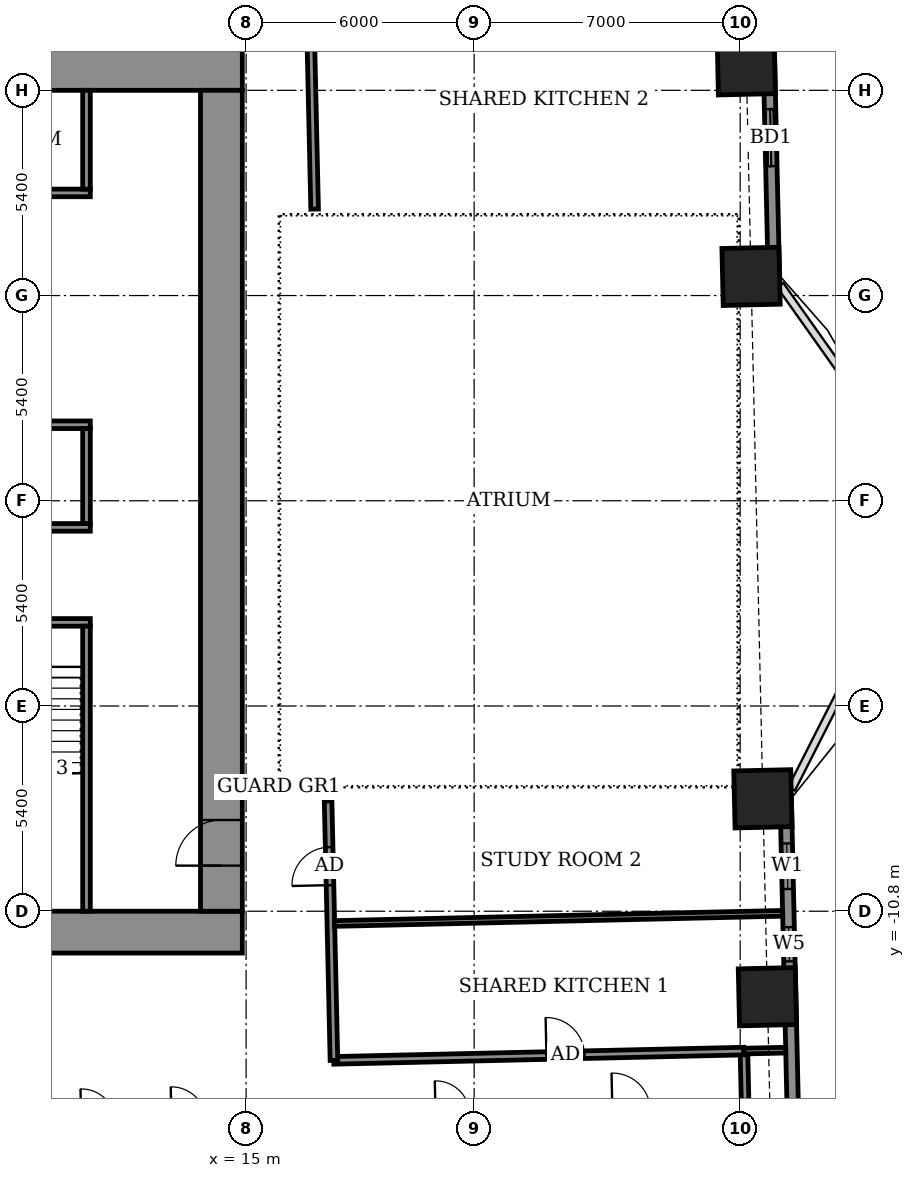
"""IFC4 building model, lengths in metres.
Left out: names, types, materials, properties, quantities, classifications, styles, units other than length and angle.
Written with IfcOpenShell. Run it as: python <this file> out.ifc"""

import sys

from ifc_helpers import new_model, si_unit, direction, frame, frame_2d, origin, origin_2d, place, context, subcontext, project, spatial, rectangle, extrude, element, fill, save


model = new_model("IFC4")
c1 = context("Model", 3, precision=1e-05, world=origin(), true_north=direction((0.0, 1.0)))
c2 = subcontext(c1, "Body", "Model", "MODEL_VIEW")
j1 = project(units=[si_unit("LENGTHUNIT", "METRE"), si_unit("PLANEANGLEUNIT", "RADIAN")], contexts=[c1])
p1 = place(None, origin())
s1 = spatial("IfcSite", under=j1, at=p1, CompositionType="ELEMENT")
p2 = place(p1, origin())
s2 = spatial("IfcBuilding", under=s1, at=p2, CompositionType="ELEMENT")
p3 = place(p2, frame((0.0, 0.0, 44.9)))
s3 = spatial("IfcBuildingStorey", under=s2, at=p3, CompositionType="ELEMENT", Elevation=44.9)
for number, where, z_axis, x_axis in (
    (1, (28.716, -13.049, -0.55), (0.0, 0.0, 1.0), (-0.023, 1.0, 0.0)),
    (2, (28.598, -7.842, -0.55), (0.0, 0.0, 1.0), (-0.023, 1.0, 0.0)),
    (3, (28.286, 5.905, -0.55), (0.0, 0.0, 1.0), (-0.023, 1.0, 0.0)),
    (4, (28.16, 11.445, -0.55), (0.0, 0.0, 1.0), (-0.023, 1.0, 0.0)),
):
    element("IfcColumn", number, at=place(p3, frame(where, z_axis=z_axis, x_axis=x_axis)), inside=s3, PredefinedType="COLUMN", context=c2, shape_type="SweptSolid", body=[
        extrude(rectangle(XDim=1.5, YDim=1.5, at=origin_2d()), origin(), (0.0, 0.0, 1.0), 3.6),
    ])
p4 = place(p3, frame((29.549, -23.299, 0.0), z_axis=(0.0, 0.0, 1.0), x_axis=(-0.022670336976, 0.999742994885, 0.0)))
e5 = element("IfcWall", 5, at=p4, inside=s3, PredefinedType="SOLIDWALL", context=c2, shape_type="SweptSolid", body=[
    extrude(rectangle(XDim=15.529, YDim=0.3, at=frame_2d((7.765, 0.0))), origin(), (0.0, 0.0, 1.0), 3.05),
])
p5 = place(p4, frame((2.119, 0.0, 0.0)))
e6 = element("IfcOpeningElement", 6, at=p5, cuts=e5, PredefinedType="OPENING", context=c2, shape_type="SweptSolid", body=[
    extrude(rectangle(XDim=1.5, YDim=2.4, at=frame_2d((0.75, 1.2))), frame((0.0, 0.16, 0.0), z_axis=(0.0, -1.0, 0.0), x_axis=(1.0, 0.0, 0.0)), (0.0, 0.0, 1.0), 0.32),
])
p6 = place(p4, frame((11.183, 0.0, 0.9)))
e7 = element("IfcOpeningElement", 7, at=p6, cuts=e5, PredefinedType="OPENING", context=c2, shape_type="SweptSolid", body=[
    extrude(rectangle(XDim=0.9, YDim=1.5, at=frame_2d((0.45, 0.75))), frame((0.0, 0.16, 0.0), z_axis=(0.0, -1.0, 0.0), x_axis=(1.0, 0.0, 0.0)), (0.0, 0.0, 1.0), 0.32),
])
p7 = place(p4, frame((13.087, 0.0, 0.9)))
e8 = element("IfcOpeningElement", 8, at=p7, cuts=e5, PredefinedType="OPENING", context=c2, shape_type="SweptSolid", body=[
    extrude(rectangle(XDim=1.2, YDim=1.5, at=frame_2d((0.6, 0.75))), frame((0.0, 0.16, 0.0), z_axis=(0.0, -1.0, 0.0), x_axis=(1.0, 0.0, 0.0)), (0.0, 0.0, 1.0), 0.32),
])
p8 = place(p3, frame((28.887, 5.864, 0.0), z_axis=(0.0, 0.0, 1.0), x_axis=(-0.022687182773, 0.999742612745, 0.0)))
e9 = element("IfcWall", 9, at=p8, inside=s3, PredefinedType="SOLIDWALL", context=c2, shape_type="SweptSolid", body=[
    extrude(rectangle(XDim=16.529, YDim=0.3, at=frame_2d((8.265, 0.0))), origin(), (0.0, 0.0, 1.0), 3.05),
])
p9 = place(p8, frame((2.942, 0.0, 0.0)))
e10 = element("IfcOpeningElement", 10, at=p9, cuts=e9, PredefinedType="OPENING", context=c2, shape_type="SweptSolid", body=[
    extrude(rectangle(XDim=1.5, YDim=2.4, at=frame_2d((0.75, 1.2))), frame((0.0, 0.16, 0.0), z_axis=(0.0, -1.0, 0.0), x_axis=(1.0, 0.0, 0.0)), (0.0, 0.0, 1.0), 0.32),
])
p10 = place(p8, frame((7.629, 0.0, 0.9)))
e11 = element("IfcOpeningElement", 11, at=p10, cuts=e9, PredefinedType="OPENING", context=c2, shape_type="SweptSolid", body=[
    extrude(rectangle(XDim=0.9, YDim=1.5, at=frame_2d((0.45, 0.75))), frame((0.0, 0.16, 0.0), z_axis=(0.0, -1.0, 0.0), x_axis=(1.0, 0.0, 0.0)), (0.0, 0.0, 1.0), 0.32),
])
p11 = place(p8, frame((12.341, 0.0, 0.9)))
e12 = element("IfcOpeningElement", 12, at=p11, cuts=e9, PredefinedType="OPENING", context=c2, shape_type="SweptSolid", body=[
    extrude(rectangle(XDim=2.4, YDim=1.5, at=frame_2d((1.2, 0.75))), frame((0.0, 0.16, 0.0), z_axis=(0.0, -1.0, 0.0), x_axis=(1.0, 0.0, 0.0)), (0.0, 0.0, 1.0), 0.32),
])
p12 = place(p3, frame((28.133, -15.979, 0.0), z_axis=(0.0, 0.0, 1.0), x_axis=(-0.022632637625, 0.99974384905, 0.0)))
e13 = element("IfcWall", 13, at=p12, inside=s3, PredefinedType="PARTITIONING", context=c2, shape_type="SweptSolid", body=[
    extrude(rectangle(XDim=1.5, YDim=0.2, at=frame_2d((0.75, 0.0))), origin(), (0.0, 0.0, 1.0), 3.05),
])
p13 = place(p3, frame((17.306, -14.724, 0.0), z_axis=(0.0, 0.0, 1.0), x_axis=(0.999744269809, 0.022614043969, 0.0)))
e14 = element("IfcWall", 14, at=p13, inside=s3, PredefinedType="PARTITIONING", context=c2, shape_type="SweptSolid", body=[
    extrude(rectangle(XDim=10.796, YDim=0.2, at=frame_2d((5.398, 0.0))), origin(), (0.0, 0.0, 1.0), 3.05),
])
p14 = place(p13, frame((5.598, 0.0, 0.0)))
e15 = element("IfcOpeningElement", 15, at=p14, cuts=e14, PredefinedType="OPENING", context=c2, shape_type="SweptSolid", body=[
    extrude(rectangle(XDim=1.0, YDim=2.1, at=frame_2d((0.5, 1.05))), frame((0.0, 0.11, 0.0), z_axis=(0.0, -1.0, 0.0), x_axis=(1.0, 0.0, 0.0)), (0.0, 0.0, 1.0), 0.22),
])
p15 = place(p3, frame((17.311, -14.724, 0.0), z_axis=(0.0, 0.0, 1.0), x_axis=(-0.022562209343, 0.999745440955, 0.0)))
e16 = element("IfcWall", 16, at=p15, inside=s3, PredefinedType="PARTITIONING", context=c2, shape_type="SweptSolid", body=[
    extrude(rectangle(XDim=6.828, YDim=0.2, at=frame_2d((3.414, 0.0))), origin(), (0.0, 0.0, 1.0), 3.05),
])
p16 = place(p15, frame((4.612, 0.0, 0.0)))
e17 = element("IfcOpeningElement", 17, at=p16, cuts=e16, PredefinedType="OPENING", context=c2, shape_type="SweptSolid", body=[
    extrude(rectangle(XDim=1.0, YDim=2.1, at=frame_2d((0.5, 1.05))), frame((0.0, 0.11, 0.0), z_axis=(0.0, -1.0, 0.0), x_axis=(1.0, 0.0, 0.0)), (0.0, 0.0, 1.0), 0.22),
])
p17 = place(p3, frame((28.095, -14.48, 0.0), z_axis=(0.0, 0.0, 1.0), x_axis=(0.999745251335, 0.022570609924, 0.0)))
e18 = element("IfcWall", 18, at=p17, inside=s3, PredefinedType="PARTITIONING", context=c2, shape_type="SweptSolid", body=[
    extrude(rectangle(XDim=1.103, YDim=0.15, at=frame_2d((0.552, 0.0))), origin(), (0.0, 0.0, 1.0), 2.55),
])
p18 = place(p3, frame((17.325, -11.123, 0.0), z_axis=(0.0, 0.0, 1.0), x_axis=(0.999741707298, 0.022727047508, 0.0)))
e19 = element("IfcWall", 19, at=p18, inside=s3, PredefinedType="PARTITIONING", context=c2, shape_type="SweptSolid", body=[
    extrude(rectangle(XDim=11.795, YDim=0.15, at=frame_2d((5.897, 0.0))), origin(), (0.0, 0.0, 1.0), 2.55),
])
p19 = place(p3, frame((16.803, 7.675, 0.0), z_axis=(0.0, 0.0, 1.0), x_axis=(-0.022667483124, 0.999743059595, 0.0)))
e20 = element("IfcWall", 20, at=p19, inside=s3, PredefinedType="PARTITIONING", context=c2, shape_type="SweptSolid", body=[
    extrude(rectangle(XDim=5.245, YDim=0.2, at=frame_2d((2.623, 0.0))), origin(), (0.0, 0.0, 1.0), 3.05),
])
for number, where, z_axis, x_axis in (
    (21, (-14.9, -11.35, 0.0), (0.0, 0.0, 1.0), (1.0, 0.0, 0.0)),
    (22, (-14.9, 11.35, 0.0), (0.0, 0.0, 1.0), (1.0, 0.0, 0.0)),
):
    element("IfcWall", number, at=place(p3, frame(where, z_axis=z_axis, x_axis=x_axis)), inside=s3, PredefinedType="SHEAR", context=c2, shape_type="SweptSolid", body=[
        extrude(rectangle(XDim=29.8, YDim=1.1, at=frame_2d((14.9, 0.0))), origin(), (0.0, 0.0, 1.0), 3.6),
    ])
p20 = place(p3, frame((14.35, -10.8, 0.0), z_axis=(0.0, 0.0, 1.0), x_axis=(0.0, 1.0, 0.0)))
e23 = element("IfcWall", 23, at=p20, inside=s3, PredefinedType="SHEAR", context=c2, shape_type="SweptSolid", body=[
    extrude(rectangle(XDim=21.6, YDim=1.1, at=frame_2d((10.8, 0.0))), origin(), (0.0, 0.0, 1.0), 3.6),
])
p21 = place(p20, frame((1.2, 0.0, 0.0)))
e24 = element("IfcOpeningElement", 24, at=p21, cuts=e23, PredefinedType="OPENING", context=c2, shape_type="SweptSolid", body=[
    extrude(rectangle(XDim=1.2, YDim=2.1, at=frame_2d((0.6, 1.05))), frame((0.0, 0.56, 0.0), z_axis=(0.0, -1.0, 0.0), x_axis=(1.0, 0.0, 0.0)), (0.0, 0.0, 1.0), 1.12),
])
p22 = place(p3, frame((-10.9, -3.2, 0.0), z_axis=(0.0, 0.0, 1.0), x_axis=(1.0, 0.0, 0.0)))
e25 = element("IfcWall", 25, at=p22, inside=s3, PredefinedType="SHEAR", context=c2, shape_type="SweptSolid", body=[
    extrude(rectangle(XDim=21.8, YDim=0.2, at=frame_2d((10.9, 0.0))), origin(), (0.0, 0.0, 1.0), 3.05),
])
p23 = place(p22, frame((1.075, 0.0, 0.0)))
e26 = element("IfcOpeningElement", 26, at=p23, cuts=e25, PredefinedType="OPENING", context=c2, shape_type="SweptSolid", body=[
    extrude(rectangle(XDim=1.1, YDim=2.1, at=frame_2d((0.55, 1.05))), frame((0.0, 0.11, 0.0), z_axis=(0.0, -1.0, 0.0), x_axis=(1.0, 0.0, 0.0)), (0.0, 0.0, 1.0), 0.22),
])
p24 = place(p22, frame((10.325, 0.0, 0.0)))
e27 = element("IfcOpeningElement", 27, at=p24, cuts=e25, PredefinedType="OPENING", context=c2, shape_type="SweptSolid", body=[
    extrude(rectangle(XDim=1.1, YDim=2.1, at=frame_2d((0.55, 1.05))), frame((0.0, 0.11, 0.0), z_axis=(0.0, -1.0, 0.0), x_axis=(1.0, 0.0, 0.0)), (0.0, 0.0, 1.0), 0.22),
])
p25 = place(p22, frame((19.625, 0.0, 0.0)))
e28 = element("IfcOpeningElement", 28, at=p25, cuts=e25, PredefinedType="OPENING", context=c2, shape_type="SweptSolid", body=[
    extrude(rectangle(XDim=1.1, YDim=2.1, at=frame_2d((0.55, 1.05))), frame((0.0, 0.11, 0.0), z_axis=(0.0, -1.0, 0.0), x_axis=(1.0, 0.0, 0.0)), (0.0, 0.0, 1.0), 0.22),
])
p26 = place(p22, frame((5.7, 0.0, 0.0)))
e29 = element("IfcOpeningElement", 29, at=p26, cuts=e25, PredefinedType="OPENING", context=c2, shape_type="SweptSolid", body=[
    extrude(rectangle(XDim=1.1, YDim=2.1, at=frame_2d((0.55, 1.05))), frame((0.0, 0.11, 0.0), z_axis=(0.0, -1.0, 0.0), x_axis=(1.0, 0.0, 0.0)), (0.0, 0.0, 1.0), 0.22),
])
p27 = place(p22, frame((14.975, 0.0, 0.0)))
e30 = element("IfcOpeningElement", 30, at=p27, cuts=e25, PredefinedType="OPENING", context=c2, shape_type="SweptSolid", body=[
    extrude(rectangle(XDim=1.1, YDim=2.1, at=frame_2d((0.55, 1.05))), frame((0.0, 0.11, 0.0), z_axis=(0.0, -1.0, 0.0), x_axis=(1.0, 0.0, 0.0)), (0.0, 0.0, 1.0), 0.22),
])
p28 = place(p3, frame((-10.9, -0.7, 0.0), z_axis=(0.0, 0.0, 1.0), x_axis=(1.0, 0.0, 0.0)))
e31 = element("IfcWall", 31, at=p28, inside=s3, PredefinedType="SHEAR", context=c2, shape_type="SweptSolid", body=[
    extrude(rectangle(XDim=21.8, YDim=0.2, at=frame_2d((10.9, 0.0))), origin(), (0.0, 0.0, 1.0), 3.05),
])
p29 = place(p3, frame((-10.9, 2.0, 0.0), z_axis=(0.0, 0.0, 1.0), x_axis=(1.0, 0.0, 0.0)))
e32 = element("IfcWall", 32, at=p29, inside=s3, PredefinedType="SHEAR", context=c2, shape_type="SweptSolid", body=[
    extrude(rectangle(XDim=21.8, YDim=0.2, at=frame_2d((10.9, 0.0))), origin(), (0.0, 0.0, 1.0), 3.05),
])
p30 = place(p29, frame((0.9, 0.0, 0.0)))
e33 = element("IfcOpeningElement", 33, at=p30, cuts=e32, PredefinedType="OPENING", context=c2, shape_type="SweptSolid", body=[
    extrude(rectangle(XDim=1.1, YDim=2.1, at=frame_2d((0.55, 1.05))), frame((0.0, 0.11, 0.0), z_axis=(0.0, -1.0, 0.0), x_axis=(1.0, 0.0, 0.0)), (0.0, 0.0, 1.0), 0.22),
])
p31 = place(p29, frame((3.6, 0.0, 0.0)))
e34 = element("IfcOpeningElement", 34, at=p31, cuts=e32, PredefinedType="OPENING", context=c2, shape_type="SweptSolid", body=[
    extrude(rectangle(XDim=1.1, YDim=2.1, at=frame_2d((0.55, 1.05))), frame((0.0, 0.11, 0.0), z_axis=(0.0, -1.0, 0.0), x_axis=(1.0, 0.0, 0.0)), (0.0, 0.0, 1.0), 0.22),
])
p32 = place(p29, frame((6.3, 0.0, 0.0)))
e35 = element("IfcOpeningElement", 35, at=p32, cuts=e32, PredefinedType="OPENING", context=c2, shape_type="SweptSolid", body=[
    extrude(rectangle(XDim=1.1, YDim=2.1, at=frame_2d((0.55, 1.05))), frame((0.0, 0.11, 0.0), z_axis=(0.0, -1.0, 0.0), x_axis=(1.0, 0.0, 0.0)), (0.0, 0.0, 1.0), 0.22),
])
p33 = place(p29, frame((9.0, 0.0, 0.0)))
e36 = element("IfcOpeningElement", 36, at=p33, cuts=e32, PredefinedType="OPENING", context=c2, shape_type="SweptSolid", body=[
    extrude(rectangle(XDim=1.1, YDim=2.1, at=frame_2d((0.55, 1.05))), frame((0.0, 0.11, 0.0), z_axis=(0.0, -1.0, 0.0), x_axis=(1.0, 0.0, 0.0)), (0.0, 0.0, 1.0), 0.22),
])
p34 = place(p29, frame((11.7, 0.0, 0.0)))
e37 = element("IfcOpeningElement", 37, at=p34, cuts=e32, PredefinedType="OPENING", context=c2, shape_type="SweptSolid", body=[
    extrude(rectangle(XDim=1.1, YDim=2.1, at=frame_2d((0.55, 1.05))), frame((0.0, 0.11, 0.0), z_axis=(0.0, -1.0, 0.0), x_axis=(1.0, 0.0, 0.0)), (0.0, 0.0, 1.0), 0.22),
])
p35 = place(p29, frame((17.2, 0.0, 0.0)))
e38 = element("IfcOpeningElement", 38, at=p35, cuts=e32, PredefinedType="OPENING", context=c2, shape_type="SweptSolid", body=[
    extrude(rectangle(XDim=0.9, YDim=2.1, at=frame_2d((0.45, 1.05))), frame((0.0, 0.11, 0.0), z_axis=(0.0, -1.0, 0.0), x_axis=(1.0, 0.0, 0.0)), (0.0, 0.0, 1.0), 0.22),
])
p36 = place(p3, frame((-10.9, 8.1, 0.0), z_axis=(0.0, 0.0, 1.0), x_axis=(1.0, 0.0, 0.0)))
e39 = element("IfcWall", 39, at=p36, inside=s3, PredefinedType="SHEAR", context=c2, shape_type="SweptSolid", body=[
    extrude(rectangle(XDim=21.8, YDim=0.2, at=frame_2d((10.9, 0.0))), origin(), (0.0, 0.0, 1.0), 3.05),
])
p37 = place(p36, frame((0.9, 0.0, 0.0)))
e40 = element("IfcOpeningElement", 40, at=p37, cuts=e39, PredefinedType="OPENING", context=c2, shape_type="SweptSolid", body=[
    extrude(rectangle(XDim=1.1, YDim=2.1, at=frame_2d((0.55, 1.05))), frame((0.0, 0.11, 0.0), z_axis=(0.0, -1.0, 0.0), x_axis=(1.0, 0.0, 0.0)), (0.0, 0.0, 1.0), 0.22),
])
p38 = place(p36, frame((3.6, 0.0, 0.0)))
e41 = element("IfcOpeningElement", 41, at=p38, cuts=e39, PredefinedType="OPENING", context=c2, shape_type="SweptSolid", body=[
    extrude(rectangle(XDim=1.1, YDim=2.1, at=frame_2d((0.55, 1.05))), frame((0.0, 0.11, 0.0), z_axis=(0.0, -1.0, 0.0), x_axis=(1.0, 0.0, 0.0)), (0.0, 0.0, 1.0), 0.22),
])
p39 = place(p36, frame((6.3, 0.0, 0.0)))
e42 = element("IfcOpeningElement", 42, at=p39, cuts=e39, PredefinedType="OPENING", context=c2, shape_type="SweptSolid", body=[
    extrude(rectangle(XDim=1.1, YDim=2.1, at=frame_2d((0.55, 1.05))), frame((0.0, 0.11, 0.0), z_axis=(0.0, -1.0, 0.0), x_axis=(1.0, 0.0, 0.0)), (0.0, 0.0, 1.0), 0.22),
])
p40 = place(p36, frame((9.0, 0.0, 0.0)))
e43 = element("IfcOpeningElement", 43, at=p40, cuts=e39, PredefinedType="OPENING", context=c2, shape_type="SweptSolid", body=[
    extrude(rectangle(XDim=1.1, YDim=2.1, at=frame_2d((0.55, 1.05))), frame((0.0, 0.11, 0.0), z_axis=(0.0, -1.0, 0.0), x_axis=(1.0, 0.0, 0.0)), (0.0, 0.0, 1.0), 0.22),
])
p41 = place(p36, frame((11.7, 0.0, 0.0)))
e44 = element("IfcOpeningElement", 44, at=p41, cuts=e39, PredefinedType="OPENING", context=c2, shape_type="SweptSolid", body=[
    extrude(rectangle(XDim=1.1, YDim=2.1, at=frame_2d((0.55, 1.05))), frame((0.0, 0.11, 0.0), z_axis=(0.0, -1.0, 0.0), x_axis=(1.0, 0.0, 0.0)), (0.0, 0.0, 1.0), 0.22),
])
p42 = place(p36, frame((14.5, 0.0, 0.0)))
e45 = element("IfcOpeningElement", 45, at=p42, cuts=e39, PredefinedType="OPENING", context=c2, shape_type="SweptSolid", body=[
    extrude(rectangle(XDim=0.9, YDim=2.1, at=frame_2d((0.45, 1.05))), frame((0.0, 0.11, 0.0), z_axis=(0.0, -1.0, 0.0), x_axis=(1.0, 0.0, 0.0)), (0.0, 0.0, 1.0), 0.22),
])
p43 = place(p36, frame((18.55, 0.0, 0.0)))
e46 = element("IfcOpeningElement", 46, at=p43, cuts=e39, PredefinedType="OPENING", context=c2, shape_type="SweptSolid", body=[
    extrude(rectangle(XDim=0.9, YDim=2.1, at=frame_2d((0.45, 1.05))), frame((0.0, 0.11, 0.0), z_axis=(0.0, -1.0, 0.0), x_axis=(1.0, 0.0, 0.0)), (0.0, 0.0, 1.0), 0.22),
])
p44 = place(p3, frame((10.8, -10.8, 0.0), z_axis=(0.0, 0.0, 1.0), x_axis=(0.0, 1.0, 0.0)))
e47 = element("IfcWall", 47, at=p44, inside=s3, PredefinedType="SHEAR", context=c2, shape_type="SweptSolid", body=[
    extrude(rectangle(XDim=7.5, YDim=0.2, at=frame_2d((3.75, 0.0))), origin(), (0.0, 0.0, 1.0), 3.05),
])
p45 = place(p3, frame((10.8, -0.6, 0.0), z_axis=(0.0, 0.0, 1.0), x_axis=(0.0, 1.0, 0.0)))
e48 = element("IfcWall", 48, at=p45, inside=s3, PredefinedType="STANDARD", context=c2, shape_type="SweptSolid", body=[
    extrude(rectangle(XDim=2.5, YDim=0.2, at=frame_2d((1.25, 0.0))), origin(), (0.0, 0.0, 1.0), 3.05),
])
p46 = place(p3, frame((10.8, 8.2, 0.0), z_axis=(0.0, 0.0, 1.0), x_axis=(0.0, 1.0, 0.0)))
e49 = element("IfcWall", 49, at=p46, inside=s3, PredefinedType="STANDARD", context=c2, shape_type="SweptSolid", body=[
    extrude(rectangle(XDim=2.6, YDim=0.2, at=frame_2d((1.3, 0.0))), origin(), (0.0, 0.0, 1.0), 3.05),
])
p47 = place(p6, origin())
e50 = element("IfcWindow", 50, at=p47, inside=s3, PartitioningType="SINGLE_PANEL", PredefinedType="WINDOW", context=c2, shape_type="SweptSolid", body=[
    extrude(rectangle(XDim=0.9, YDim=1.5, at=frame_2d((0.45, 0.75))), frame((0.0, 0.03, 0.0), z_axis=(0.0, -1.0, 0.0), x_axis=(1.0, 0.0, 0.0)), (0.0, 0.0, 1.0), 0.06),
])
fill(e7, e50)
p48 = place(p7, origin())
e51 = element("IfcWindow", 51, at=p48, inside=s3, PartitioningType="SINGLE_PANEL", PredefinedType="WINDOW", context=c2, shape_type="SweptSolid", body=[
    extrude(rectangle(XDim=1.2, YDim=1.5, at=frame_2d((0.6, 0.75))), frame((0.0, 0.03, 0.0), z_axis=(0.0, -1.0, 0.0), x_axis=(1.0, 0.0, 0.0)), (0.0, 0.0, 1.0), 0.06),
])
fill(e8, e51)
p49 = place(p9, origin())
e52 = element("IfcDoor", 52, at=p49, inside=s3, OperationType="SLIDING_TO_LEFT", PredefinedType="DOOR", context=c2, shape_type="SweptSolid", body=[
    extrude(rectangle(XDim=1.5, YDim=2.4, at=frame_2d((0.75, 1.2))), frame((0.0, 0.025, 0.0), z_axis=(0.0, -1.0, 0.0), x_axis=(1.0, 0.0, 0.0)), (0.0, 0.0, 1.0), 0.05),
])
fill(e10, e52)
p50 = place(p14, origin())
e53 = element("IfcDoor", 53, at=p50, inside=s3, OperationType="SINGLE_SWING_LEFT", PredefinedType="DOOR", context=c2, shape_type="SweptSolid", body=[
    extrude(rectangle(XDim=1.0, YDim=2.1, at=frame_2d((0.5, 1.05))), frame((0.0, 0.025, 0.0), z_axis=(0.0, -1.0, 0.0), x_axis=(1.0, 0.0, 0.0)), (0.0, 0.0, 1.0), 0.05),
])
fill(e15, e53)
p51 = place(p16, origin())
e54 = element("IfcDoor", 54, at=p51, inside=s3, OperationType="SINGLE_SWING_RIGHT", PredefinedType="DOOR", context=c2, shape_type="SweptSolid", body=[
    extrude(rectangle(XDim=1.0, YDim=2.1, at=frame_2d((0.5, 1.05))), frame((0.0, 0.025, 0.0), z_axis=(0.0, -1.0, 0.0), x_axis=(1.0, 0.0, 0.0)), (0.0, 0.0, 1.0), 0.05),
])
fill(e17, e54)
p52 = place(p21, origin())
e55 = element("IfcDoor", 55, at=p52, inside=s3, OperationType="DOUBLE_DOOR_SINGLE_SWING", PredefinedType="DOOR", context=c2, shape_type="SweptSolid", body=[
    extrude(rectangle(XDim=1.2, YDim=2.1, at=frame_2d((0.6, 1.05))), frame((0.0, 0.025, 0.0), z_axis=(0.0, -1.0, 0.0), x_axis=(1.0, 0.0, 0.0)), (0.0, 0.0, 1.0), 0.05),
])
fill(e24, e55)
save(model, sys.argv[1])
